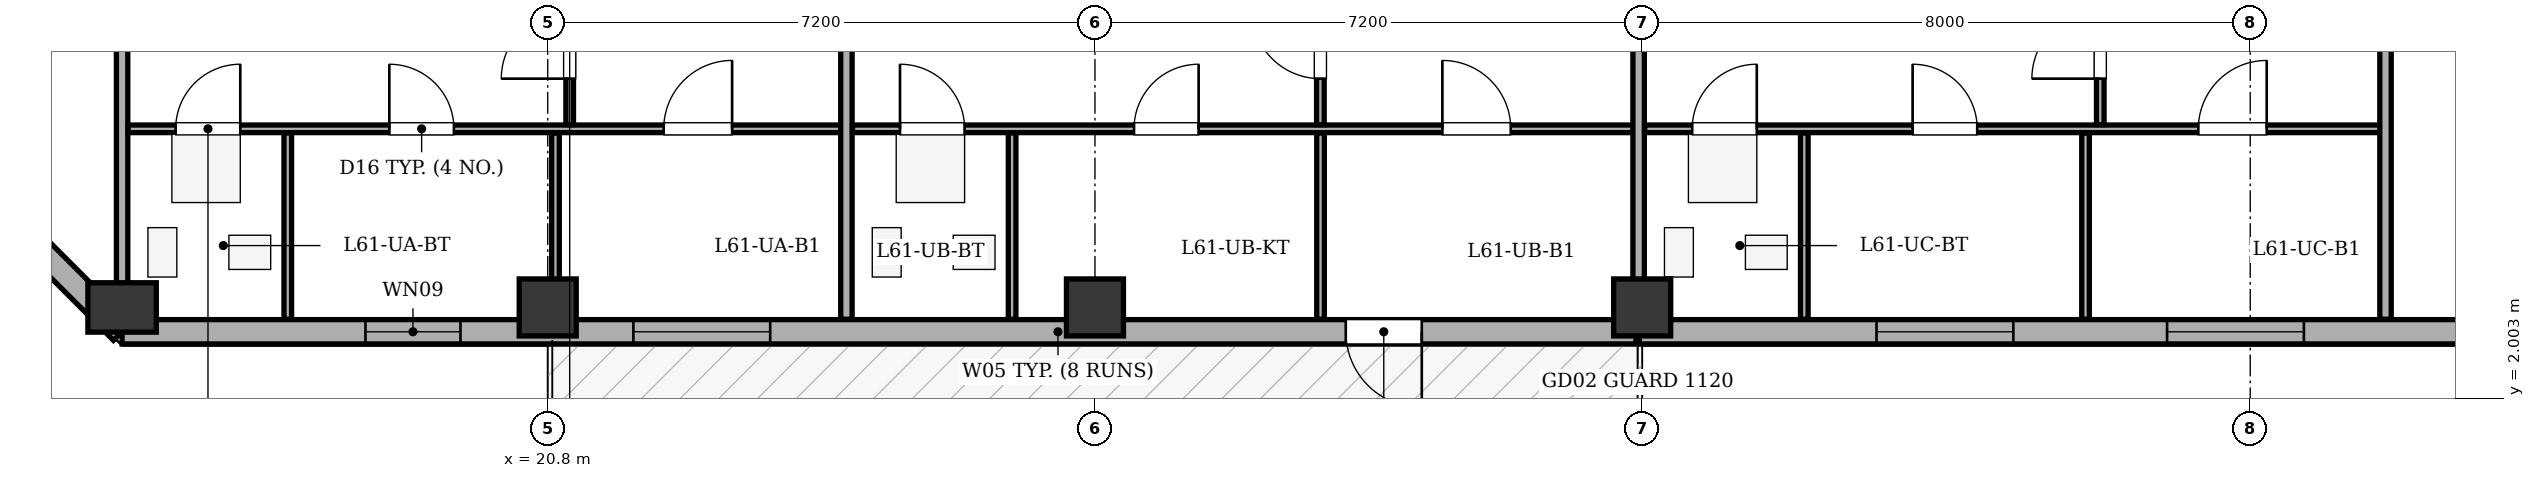
"""IFC4 building model, lengths in metres.
Left out: names, types, materials, properties, quantities, classifications, styles, units other than length and angle.
Written with IfcOpenShell. Run it as: python <this file> out.ifc"""

import sys

from ifc_helpers import new_model, si_unit, direction, frame, frame_2d, origin, origin_2d, place, context, subcontext, project, spatial, rectangle, extrude, element, fill, save


model = new_model("IFC4")
c1 = context("Model", 3, precision=1e-05, world=origin(), true_north=direction((0.0, 1.0)))
c2 = subcontext(c1, "Body", "Model", "MODEL_VIEW")
j1 = project(units=[si_unit("LENGTHUNIT", "METRE"), si_unit("PLANEANGLEUNIT", "RADIAN")], contexts=[c1])
p1 = place(None, origin())
s1 = spatial("IfcSite", under=j1, at=p1, CompositionType="ELEMENT")
p2 = place(p1, origin())
s2 = spatial("IfcBuilding", under=s1, at=p2, CompositionType="ELEMENT")
p3 = place(p2, frame((0.0, 0.0, 234.7)))
s3 = spatial("IfcBuildingStorey", under=s2, at=p3, CompositionType="ELEMENT", Elevation=234.7)
p4 = place(p3, frame((15.2, 3.2, 0.0), z_axis=(0.0, 0.0, 1.0), x_axis=(1.0, 0.0, 0.0)))
e1 = element("IfcColumn", 1, at=p4, inside=s3, PredefinedType="COLUMN", context=c2, shape_type="SweptSolid", body=[
    extrude(rectangle(XDim=0.65, YDim=0.9, at=origin_2d()), origin(), (0.0, 0.0, 1.0), 3.4),
])
for number, where, z_axis, x_axis in (
    (2, (20.8, 3.2, 0.0), (0.0, 0.0, 1.0), (1.0, 0.0, 0.0)),
    (3, (28.0, 3.2, 0.0), (0.0, 0.0, 1.0), (1.0, 0.0, 0.0)),
    (4, (35.2, 3.2, 0.0), (0.0, 0.0, 1.0), (1.0, 0.0, 0.0)),
):
    element("IfcColumn", number, at=place(p3, frame(where, z_axis=z_axis, x_axis=x_axis)), inside=s3, PredefinedType="COLUMN", context=c2, shape_type="SweptSolid", body=[
        extrude(rectangle(XDim=0.75, YDim=0.75, at=origin_2d()), origin(), (0.0, 0.0, 1.0), 3.4),
    ])
p5 = place(p3, frame((51.2, 2.88, 0.0), z_axis=(0.0, 0.0, 1.0), x_axis=(-1.0, 0.0, 0.0)))
e5 = element("IfcWall", 5, at=p5, inside=s3, PredefinedType="STANDARD", context=c2, shape_type="SweptSolid", body=[
    extrude(rectangle(XDim=36.0, YDim=0.32, at=frame_2d((18.0, 0.0))), origin(), (0.0, 0.0, 1.0), 2.725),
])
p6 = place(p5, frame((18.9, 0.0, 0.0)))
e6 = element("IfcOpeningElement", 6, at=p6, cuts=e5, PredefinedType="OPENING", context=c2, shape_type="SweptSolid", body=[
    extrude(rectangle(XDim=1.0, YDim=2.02, at=frame_2d((0.5, 1.01))), frame((0.0, 0.17, 0.0), z_axis=(0.0, -1.0, 0.0), x_axis=(1.0, 0.0, 0.0)), (0.0, 0.0, 1.0), 0.34),
])
p7 = place(p5, frame((2.31, 0.0, 0.75)))
e7 = element("IfcOpeningElement", 7, at=p7, cuts=e5, PredefinedType="OPENING", context=c2, shape_type="SweptSolid", body=[
    extrude(rectangle(XDim=1.8, YDim=1.7, at=frame_2d((0.9, 0.85))), frame((0.0, 0.17, 0.0), z_axis=(0.0, -1.0, 0.0), x_axis=(1.0, 0.0, 0.0)), (0.0, 0.0, 1.0), 0.34),
])
p8 = place(p5, frame((7.294, 0.0, 0.75)))
e8 = element("IfcOpeningElement", 8, at=p8, cuts=e5, PredefinedType="OPENING", context=c2, shape_type="SweptSolid", body=[
    extrude(rectangle(XDim=1.8, YDim=1.7, at=frame_2d((0.9, 0.85))), frame((0.0, 0.17, 0.0), z_axis=(0.0, -1.0, 0.0), x_axis=(1.0, 0.0, 0.0)), (0.0, 0.0, 1.0), 0.34),
])
p9 = place(p5, frame((11.117, 0.0, 0.75)))
e9 = element("IfcOpeningElement", 9, at=p9, cuts=e5, PredefinedType="OPENING", context=c2, shape_type="SweptSolid", body=[
    extrude(rectangle(XDim=1.8, YDim=1.7, at=frame_2d((0.9, 0.85))), frame((0.0, 0.17, 0.0), z_axis=(0.0, -1.0, 0.0), x_axis=(1.0, 0.0, 0.0)), (0.0, 0.0, 1.0), 0.34),
])
p10 = place(p5, frame((27.473, 0.0, 0.75)))
e10 = element("IfcOpeningElement", 10, at=p10, cuts=e5, PredefinedType="OPENING", context=c2, shape_type="SweptSolid", body=[
    extrude(rectangle(XDim=1.8, YDim=1.7, at=frame_2d((0.9, 0.85))), frame((0.0, 0.17, 0.0), z_axis=(0.0, -1.0, 0.0), x_axis=(1.0, 0.0, 0.0)), (0.0, 0.0, 1.0), 0.34),
])
p11 = place(p5, frame((31.548, 0.0, 0.75)))
e11 = element("IfcOpeningElement", 11, at=p11, cuts=e5, PredefinedType="OPENING", context=c2, shape_type="SweptSolid", body=[
    extrude(rectangle(XDim=1.25, YDim=1.7, at=frame_2d((0.625, 0.85))), frame((0.0, 0.17, 0.0), z_axis=(0.0, -1.0, 0.0), x_axis=(1.0, 0.0, 0.0)), (0.0, 0.0, 1.0), 0.34),
])
p12 = place(p3, frame((15.2, 2.88, 0.0), z_axis=(0.0, 0.0, 1.0), x_axis=(-0.707106781187, 0.707106781187, 0.0)))
e12 = element("IfcWall", 12, at=p12, inside=s3, PredefinedType="STANDARD", context=c2, shape_type="SweptSolid", body=[
    extrude(rectangle(XDim=6.11, YDim=0.32, at=frame_2d((3.055, 0.0))), origin(), (0.0, 0.0, 1.0), 2.725),
])
p13 = place(p12, frame((2.355, 0.0, 0.75)))
e13 = element("IfcOpeningElement", 13, at=p13, cuts=e12, PredefinedType="OPENING", context=c2, shape_type="SweptSolid", body=[
    extrude(rectangle(XDim=1.4, YDim=1.65, at=frame_2d((0.7, 0.825))), frame((0.0, 0.17, 0.0), z_axis=(0.0, -1.0, 0.0), x_axis=(1.0, 0.0, 0.0)), (0.0, 0.0, 1.0), 0.34),
])
p14 = place(p3, frame((15.2, 3.045, 0.0), z_axis=(0.0, 0.0, 1.0), x_axis=(0.0, 1.0, 0.0)))
e14 = element("IfcWall", 14, at=p14, inside=s3, PredefinedType="PARTITIONING", context=c2, shape_type="SweptSolid", body=[
    extrude(rectangle(XDim=15.255, YDim=0.15, at=frame_2d((7.627, 0.0))), origin(), (0.0, 0.0, 1.0), 3.1),
])
p15 = place(p3, frame((15.28, 5.55, 0.0), z_axis=(0.0, 0.0, 1.0), x_axis=(1.0, 0.0, 0.0)))
e15 = element("IfcWall", 15, at=p15, inside=s3, PredefinedType="PARTITIONING", context=c2, shape_type="SweptSolid", body=[
    extrude(rectangle(XDim=9.49, YDim=0.1, at=frame_2d((4.745, 0.0))), origin(), (0.0, 0.0, 1.0), 3.1),
])
p16 = place(p15, frame((0.625, 0.0, 0.0)))
e16 = element("IfcOpeningElement", 16, at=p16, cuts=e15, PredefinedType="OPENING", context=c2, shape_type="SweptSolid", body=[
    extrude(rectangle(XDim=0.85, YDim=2.05, at=frame_2d((0.425, 1.025))), frame((0.0, 0.06, 0.0), z_axis=(0.0, -1.0, 0.0), x_axis=(1.0, 0.0, 0.0)), (0.0, 0.0, 1.0), 0.12),
])
p17 = place(p15, frame((3.436, 0.0, 0.0)))
e17 = element("IfcOpeningElement", 17, at=p17, cuts=e15, PredefinedType="OPENING", context=c2, shape_type="SweptSolid", body=[
    extrude(rectangle(XDim=0.85, YDim=2.05, at=frame_2d((0.425, 1.025))), frame((0.0, 0.06, 0.0), z_axis=(0.0, -1.0, 0.0), x_axis=(1.0, 0.0, 0.0)), (0.0, 0.0, 1.0), 0.12),
])
p18 = place(p15, frame((7.046, 0.0, 0.0)))
e18 = element("IfcOpeningElement", 18, at=p18, cuts=e15, PredefinedType="OPENING", context=c2, shape_type="SweptSolid", body=[
    extrude(rectangle(XDim=0.9, YDim=2.05, at=frame_2d((0.45, 1.025))), frame((0.0, 0.06, 0.0), z_axis=(0.0, -1.0, 0.0), x_axis=(1.0, 0.0, 0.0)), (0.0, 0.0, 1.0), 0.12),
])
p19 = place(p3, frame((21.089, 5.605, 0.0), z_axis=(0.0, 0.0, 1.0), x_axis=(0.0, 1.0, 0.0)))
e19 = element("IfcWall", 19, at=p19, inside=s3, PredefinedType="PARTITIONING", context=c2, shape_type="SweptSolid", body=[
    extrude(rectangle(XDim=12.695, YDim=0.1, at=frame_2d((6.348, 0.0))), origin(), (0.0, 0.0, 1.0), 2.535),
])
p20 = place(p19, frame((0.605, 0.0, 0.0)))
e20 = element("IfcOpeningElement", 20, at=p20, cuts=e19, PredefinedType="OPENING", context=c2, shape_type="SweptSolid", body=[
    extrude(rectangle(XDim=0.9, YDim=2.05, at=frame_2d((0.45, 1.025))), frame((0.0, 0.06, 0.0), z_axis=(0.0, -1.0, 0.0), x_axis=(1.0, 0.0, 0.0)), (0.0, 0.0, 1.0), 0.12),
])
p21 = place(p3, frame((17.38, 3.045, 0.0), z_axis=(0.0, 0.0, 1.0), x_axis=(0.0, 1.0, 0.0)))
e21 = element("IfcWall", 21, at=p21, inside=s3, PredefinedType="PARTITIONING", context=c2, shape_type="SweptSolid", body=[
    extrude(rectangle(XDim=2.45, YDim=0.1, at=frame_2d((1.225, 0.0))), origin(), (0.0, 0.0, 1.0), 3.1),
])
p22 = place(p3, frame((20.902, 3.045, 0.0), z_axis=(0.0, 0.0, 1.0), x_axis=(0.0, 1.0, 0.0)))
e22 = element("IfcWall", 22, at=p22, inside=s3, PredefinedType="PARTITIONING", context=c2, shape_type="SweptSolid", body=[
    extrude(rectangle(XDim=2.45, YDim=0.1, at=frame_2d((1.225, 0.0))), origin(), (0.0, 0.0, 1.0), 2.535),
])
p23 = place(p3, frame((24.73, 3.045, 0.0), z_axis=(0.0, 0.0, 1.0), x_axis=(0.0, 1.0, 0.0)))
e23 = element("IfcWall", 23, at=p23, inside=s3, PredefinedType="PARTITIONING", context=c2, shape_type="SweptSolid", body=[
    extrude(rectangle(XDim=15.255, YDim=0.15, at=frame_2d((7.627, 0.0))), origin(), (0.0, 0.0, 1.0), 3.1),
])
p24 = place(p3, frame((24.81, 5.55, 0.0), z_axis=(0.0, 0.0, 1.0), x_axis=(1.0, 0.0, 0.0)))
e24 = element("IfcWall", 24, at=p24, inside=s3, PredefinedType="PARTITIONING", context=c2, shape_type="SweptSolid", body=[
    extrude(rectangle(XDim=10.383, YDim=0.1, at=frame_2d((5.191, 0.0))), origin(), (0.0, 0.0, 1.0), 3.1),
])
p25 = place(p24, frame((0.625, 0.0, 0.0)))
e25 = element("IfcOpeningElement", 25, at=p25, cuts=e24, PredefinedType="OPENING", context=c2, shape_type="SweptSolid", body=[
    extrude(rectangle(XDim=0.85, YDim=2.05, at=frame_2d((0.425, 1.025))), frame((0.0, 0.06, 0.0), z_axis=(0.0, -1.0, 0.0), x_axis=(1.0, 0.0, 0.0)), (0.0, 0.0, 1.0), 0.12),
])
p26 = place(p24, frame((3.704, 0.0, 0.0)))
e26 = element("IfcOpeningElement", 26, at=p26, cuts=e24, PredefinedType="OPENING", context=c2, shape_type="SweptSolid", body=[
    extrude(rectangle(XDim=0.85, YDim=2.05, at=frame_2d((0.425, 1.025))), frame((0.0, 0.06, 0.0), z_axis=(0.0, -1.0, 0.0), x_axis=(1.0, 0.0, 0.0)), (0.0, 0.0, 1.0), 0.12),
])
p27 = place(p24, frame((7.761, 0.0, 0.0)))
e27 = element("IfcOpeningElement", 27, at=p27, cuts=e24, PredefinedType="OPENING", context=c2, shape_type="SweptSolid", body=[
    extrude(rectangle(XDim=0.9, YDim=2.05, at=frame_2d((0.45, 1.025))), frame((0.0, 0.06, 0.0), z_axis=(0.0, -1.0, 0.0), x_axis=(1.0, 0.0, 0.0)), (0.0, 0.0, 1.0), 0.12),
])
p28 = place(p3, frame((30.966, 5.605, 0.0), z_axis=(0.0, 0.0, 1.0), x_axis=(0.0, 1.0, 0.0)))
e28 = element("IfcWall", 28, at=p28, inside=s3, PredefinedType="PARTITIONING", context=c2, shape_type="SweptSolid", body=[
    extrude(rectangle(XDim=12.695, YDim=0.1, at=frame_2d((6.348, 0.0))), origin(), (0.0, 0.0, 1.0), 3.1),
])
p29 = place(p28, frame((0.605, 0.0, 0.0)))
e29 = element("IfcOpeningElement", 29, at=p29, cuts=e28, PredefinedType="OPENING", context=c2, shape_type="SweptSolid", body=[
    extrude(rectangle(XDim=0.9, YDim=2.05, at=frame_2d((0.45, 1.025))), frame((0.0, 0.06, 0.0), z_axis=(0.0, -1.0, 0.0), x_axis=(1.0, 0.0, 0.0)), (0.0, 0.0, 1.0), 0.12),
])
for number, where, z_axis, x_axis in (
    (30, (26.91, 3.045, 0.0), (0.0, 0.0, 1.0), (0.0, 1.0, 0.0)),
    (31, (30.968, 3.045, 0.0), (0.0, 0.0, 1.0), (0.0, 1.0, 0.0)),
):
    element("IfcWall", number, at=place(p3, frame(where, z_axis=z_axis, x_axis=x_axis)), inside=s3, PredefinedType="PARTITIONING", context=c2, shape_type="SweptSolid", body=[
        extrude(rectangle(XDim=2.45, YDim=0.1, at=frame_2d((1.225, 0.0))), origin(), (0.0, 0.0, 1.0), 3.1),
    ])
p30 = place(p3, frame((35.153, 3.045, 0.0), z_axis=(0.0, 0.0, 1.0), x_axis=(0.0, 1.0, 0.0)))
e32 = element("IfcWall", 32, at=p30, inside=s3, PredefinedType="PARTITIONING", context=c2, shape_type="SweptSolid", body=[
    extrude(rectangle(XDim=15.255, YDim=0.15, at=frame_2d((7.627, 0.0))), origin(), (0.0, 0.0, 1.0), 2.535),
])
p31 = place(p3, frame((35.233, 5.55, 0.0), z_axis=(0.0, 0.0, 1.0), x_axis=(1.0, 0.0, 0.0)))
e33 = element("IfcWall", 33, at=p31, inside=s3, PredefinedType="PARTITIONING", context=c2, shape_type="SweptSolid", body=[
    extrude(rectangle(XDim=9.787, YDim=0.1, at=frame_2d((4.894, 0.0))), origin(), (0.0, 0.0, 1.0), 3.1),
])
p32 = place(p31, frame((0.625, 0.0, 0.0)))
e34 = element("IfcOpeningElement", 34, at=p32, cuts=e33, PredefinedType="OPENING", context=c2, shape_type="SweptSolid", body=[
    extrude(rectangle(XDim=0.85, YDim=2.05, at=frame_2d((0.425, 1.025))), frame((0.0, 0.06, 0.0), z_axis=(0.0, -1.0, 0.0), x_axis=(1.0, 0.0, 0.0)), (0.0, 0.0, 1.0), 0.12),
])
p33 = place(p31, frame((3.525, 0.0, 0.0)))
e35 = element("IfcOpeningElement", 35, at=p33, cuts=e33, PredefinedType="OPENING", context=c2, shape_type="SweptSolid", body=[
    extrude(rectangle(XDim=0.85, YDim=2.05, at=frame_2d((0.425, 1.025))), frame((0.0, 0.06, 0.0), z_axis=(0.0, -1.0, 0.0), x_axis=(1.0, 0.0, 0.0)), (0.0, 0.0, 1.0), 0.12),
])
p34 = place(p31, frame((7.284, 0.0, 0.0)))
e36 = element("IfcOpeningElement", 36, at=p34, cuts=e33, PredefinedType="OPENING", context=c2, shape_type="SweptSolid", body=[
    extrude(rectangle(XDim=0.9, YDim=2.05, at=frame_2d((0.45, 1.025))), frame((0.0, 0.06, 0.0), z_axis=(0.0, -1.0, 0.0), x_axis=(1.0, 0.0, 0.0)), (0.0, 0.0, 1.0), 0.12),
])
p35 = place(p3, frame((41.227, 5.605, 0.0), z_axis=(0.0, 0.0, 1.0), x_axis=(0.0, 1.0, 0.0)))
e37 = element("IfcWall", 37, at=p35, inside=s3, PredefinedType="PARTITIONING", context=c2, shape_type="SweptSolid", body=[
    extrude(rectangle(XDim=12.695, YDim=0.1, at=frame_2d((6.348, 0.0))), origin(), (0.0, 0.0, 1.0), 3.1),
])
p36 = place(p35, frame((0.605, 0.0, 0.0)))
e38 = element("IfcOpeningElement", 38, at=p36, cuts=e37, PredefinedType="OPENING", context=c2, shape_type="SweptSolid", body=[
    extrude(rectangle(XDim=0.9, YDim=2.05, at=frame_2d((0.45, 1.025))), frame((0.0, 0.06, 0.0), z_axis=(0.0, -1.0, 0.0), x_axis=(1.0, 0.0, 0.0)), (0.0, 0.0, 1.0), 0.12),
])
for number, where, z_axis, x_axis in (
    (39, (37.333, 3.045, 0.0), (0.0, 0.0, 1.0), (0.0, 1.0, 0.0)),
    (40, (41.033, 3.045, 0.0), (0.0, 0.0, 1.0), (0.0, 1.0, 0.0)),
):
    element("IfcWall", number, at=place(p3, frame(where, z_axis=z_axis, x_axis=x_axis)), inside=s3, PredefinedType="PARTITIONING", context=c2, shape_type="SweptSolid", body=[
        extrude(rectangle(XDim=2.45, YDim=0.1, at=frame_2d((1.225, 0.0))), origin(), (0.0, 0.0, 1.0), 3.1),
    ])
p37 = place(p3, frame((44.98, 3.045, 0.0), z_axis=(0.0, 0.0, 1.0), x_axis=(0.0, 1.0, 0.0)))
e41 = element("IfcWall", 41, at=p37, inside=s3, PredefinedType="PARTITIONING", context=c2, shape_type="SweptSolid", body=[
    extrude(rectangle(XDim=15.255, YDim=0.15, at=frame_2d((7.627, 0.0))), origin(), (0.0, 0.0, 1.0), 2.725),
])
p38 = place(p6, origin())
e42 = element("IfcDoor", 42, at=p38, inside=s3, OperationType="SINGLE_SWING_LEFT", PredefinedType="DOOR", context=c2, shape_type="SweptSolid", body=[
    extrude(rectangle(XDim=1.0, YDim=2.02, at=frame_2d((0.5, 1.01))), frame((0.0, 0.025, 0.0), z_axis=(0.0, -1.0, 0.0), x_axis=(1.0, 0.0, 0.0)), (0.0, 0.0, 1.0), 0.05),
])
fill(e6, e42)
p39 = place(p8, origin())
e43 = element("IfcWindow", 43, at=p39, inside=s3, PartitioningType="SINGLE_PANEL", PredefinedType="WINDOW", context=c2, shape_type="SweptSolid", body=[
    extrude(rectangle(XDim=1.8, YDim=1.7, at=frame_2d((0.9, 0.85))), frame((0.0, -0.01, 0.0), z_axis=(0.0, -1.0, 0.0), x_axis=(1.0, 0.0, 0.0)), (0.0, 0.0, 1.0), 0.06),
])
fill(e8, e43)
p40 = place(p9, origin())
e44 = element("IfcWindow", 44, at=p40, inside=s3, PartitioningType="SINGLE_PANEL", PredefinedType="WINDOW", context=c2, shape_type="SweptSolid", body=[
    extrude(rectangle(XDim=1.8, YDim=1.7, at=frame_2d((0.9, 0.85))), frame((0.0, -0.01, 0.0), z_axis=(0.0, -1.0, 0.0), x_axis=(1.0, 0.0, 0.0)), (0.0, 0.0, 1.0), 0.06),
])
fill(e9, e44)
p41 = place(p10, origin())
e45 = element("IfcWindow", 45, at=p41, inside=s3, PartitioningType="SINGLE_PANEL", PredefinedType="WINDOW", context=c2, shape_type="SweptSolid", body=[
    extrude(rectangle(XDim=1.8, YDim=1.7, at=frame_2d((0.9, 0.85))), frame((0.0, -0.01, 0.0), z_axis=(0.0, -1.0, 0.0), x_axis=(1.0, 0.0, 0.0)), (0.0, 0.0, 1.0), 0.06),
])
fill(e10, e45)
p42 = place(p11, origin())
e46 = element("IfcWindow", 46, at=p42, inside=s3, PartitioningType="SINGLE_PANEL", PredefinedType="WINDOW", context=c2, shape_type="SweptSolid", body=[
    extrude(rectangle(XDim=1.25, YDim=1.7, at=frame_2d((0.625, 0.85))), frame((0.0, -0.01, 0.0), z_axis=(0.0, -1.0, 0.0), x_axis=(1.0, 0.0, 0.0)), (0.0, 0.0, 1.0), 0.06),
])
fill(e11, e46)
p43 = place(p20, origin())
e47 = element("IfcDoor", 47, at=p43, inside=s3, OperationType="SINGLE_SWING_LEFT", PredefinedType="DOOR", context=c2, shape_type="SweptSolid", body=[
    extrude(rectangle(XDim=0.9, YDim=2.05, at=frame_2d((0.45, 1.025))), frame((0.0, 0.025, 0.0), z_axis=(0.0, -1.0, 0.0), x_axis=(1.0, 0.0, 0.0)), (0.0, 0.0, 1.0), 0.05),
])
fill(e20, e47)
p44 = place(p16, origin())
e48 = element("IfcDoor", 48, at=p44, inside=s3, OperationType="SINGLE_SWING_RIGHT", PredefinedType="DOOR", context=c2, shape_type="SweptSolid", body=[
    extrude(rectangle(XDim=0.85, YDim=2.05, at=frame_2d((0.425, 1.025))), frame((0.0, 0.025, 0.0), z_axis=(0.0, -1.0, 0.0), x_axis=(1.0, 0.0, 0.0)), (0.0, 0.0, 1.0), 0.05),
])
fill(e16, e48)
p45 = place(p17, origin())
e49 = element("IfcDoor", 49, at=p45, inside=s3, OperationType="SINGLE_SWING_LEFT", PredefinedType="DOOR", context=c2, shape_type="SweptSolid", body=[
    extrude(rectangle(XDim=0.85, YDim=2.05, at=frame_2d((0.425, 1.025))), frame((0.0, 0.025, 0.0), z_axis=(0.0, -1.0, 0.0), x_axis=(1.0, 0.0, 0.0)), (0.0, 0.0, 1.0), 0.05),
])
fill(e17, e49)
p46 = place(p18, origin())
e50 = element("IfcDoor", 50, at=p46, inside=s3, OperationType="SINGLE_SWING_RIGHT", PredefinedType="DOOR", context=c2, shape_type="SweptSolid", body=[
    extrude(rectangle(XDim=0.9, YDim=2.05, at=frame_2d((0.45, 1.025))), frame((0.0, 0.025, 0.0), z_axis=(0.0, -1.0, 0.0), x_axis=(1.0, 0.0, 0.0)), (0.0, 0.0, 1.0), 0.05),
])
fill(e18, e50)
p47 = place(p29, origin())
e51 = element("IfcDoor", 51, at=p47, inside=s3, OperationType="SINGLE_SWING_RIGHT", PredefinedType="DOOR", context=c2, shape_type="SweptSolid", body=[
    extrude(rectangle(XDim=0.9, YDim=2.05, at=frame_2d((0.45, 1.025))), frame((0.0, 0.025, 0.0), z_axis=(0.0, -1.0, 0.0), x_axis=(1.0, 0.0, 0.0)), (0.0, 0.0, 1.0), 0.05),
])
fill(e29, e51)
p48 = place(p25, origin())
e52 = element("IfcDoor", 52, at=p48, inside=s3, OperationType="SINGLE_SWING_LEFT", PredefinedType="DOOR", context=c2, shape_type="SweptSolid", body=[
    extrude(rectangle(XDim=0.85, YDim=2.05, at=frame_2d((0.425, 1.025))), frame((0.0, 0.025, 0.0), z_axis=(0.0, -1.0, 0.0), x_axis=(1.0, 0.0, 0.0)), (0.0, 0.0, 1.0), 0.05),
])
fill(e25, e52)
p49 = place(p26, origin())
e53 = element("IfcDoor", 53, at=p49, inside=s3, OperationType="SINGLE_SWING_RIGHT", PredefinedType="DOOR", context=c2, shape_type="SweptSolid", body=[
    extrude(rectangle(XDim=0.85, YDim=2.05, at=frame_2d((0.425, 1.025))), frame((0.0, 0.025, 0.0), z_axis=(0.0, -1.0, 0.0), x_axis=(1.0, 0.0, 0.0)), (0.0, 0.0, 1.0), 0.05),
])
fill(e26, e53)
p50 = place(p27, origin())
e54 = element("IfcDoor", 54, at=p50, inside=s3, OperationType="SINGLE_SWING_LEFT", PredefinedType="DOOR", context=c2, shape_type="SweptSolid", body=[
    extrude(rectangle(XDim=0.9, YDim=2.05, at=frame_2d((0.45, 1.025))), frame((0.0, 0.025, 0.0), z_axis=(0.0, -1.0, 0.0), x_axis=(1.0, 0.0, 0.0)), (0.0, 0.0, 1.0), 0.05),
])
fill(e27, e54)
p51 = place(p36, origin())
e55 = element("IfcDoor", 55, at=p51, inside=s3, OperationType="SINGLE_SWING_LEFT", PredefinedType="DOOR", context=c2, shape_type="SweptSolid", body=[
    extrude(rectangle(XDim=0.9, YDim=2.05, at=frame_2d((0.45, 1.025))), frame((0.0, 0.025, 0.0), z_axis=(0.0, -1.0, 0.0), x_axis=(1.0, 0.0, 0.0)), (0.0, 0.0, 1.0), 0.05),
])
fill(e38, e55)
p52 = place(p32, origin())
e56 = element("IfcDoor", 56, at=p52, inside=s3, OperationType="SINGLE_SWING_RIGHT", PredefinedType="DOOR", context=c2, shape_type="SweptSolid", body=[
    extrude(rectangle(XDim=0.85, YDim=2.05, at=frame_2d((0.425, 1.025))), frame((0.0, 0.025, 0.0), z_axis=(0.0, -1.0, 0.0), x_axis=(1.0, 0.0, 0.0)), (0.0, 0.0, 1.0), 0.05),
])
fill(e34, e56)
p53 = place(p33, origin())
e57 = element("IfcDoor", 57, at=p53, inside=s3, OperationType="SINGLE_SWING_LEFT", PredefinedType="DOOR", context=c2, shape_type="SweptSolid", body=[
    extrude(rectangle(XDim=0.85, YDim=2.05, at=frame_2d((0.425, 1.025))), frame((0.0, 0.025, 0.0), z_axis=(0.0, -1.0, 0.0), x_axis=(1.0, 0.0, 0.0)), (0.0, 0.0, 1.0), 0.05),
])
fill(e35, e57)
p54 = place(p34, origin())
e58 = element("IfcDoor", 58, at=p54, inside=s3, OperationType="SINGLE_SWING_RIGHT", PredefinedType="DOOR", context=c2, shape_type="SweptSolid", body=[
    extrude(rectangle(XDim=0.9, YDim=2.05, at=frame_2d((0.45, 1.025))), frame((0.0, 0.025, 0.0), z_axis=(0.0, -1.0, 0.0), x_axis=(1.0, 0.0, 0.0)), (0.0, 0.0, 1.0), 0.05),
])
fill(e36, e58)
save(model, sys.argv[1])
